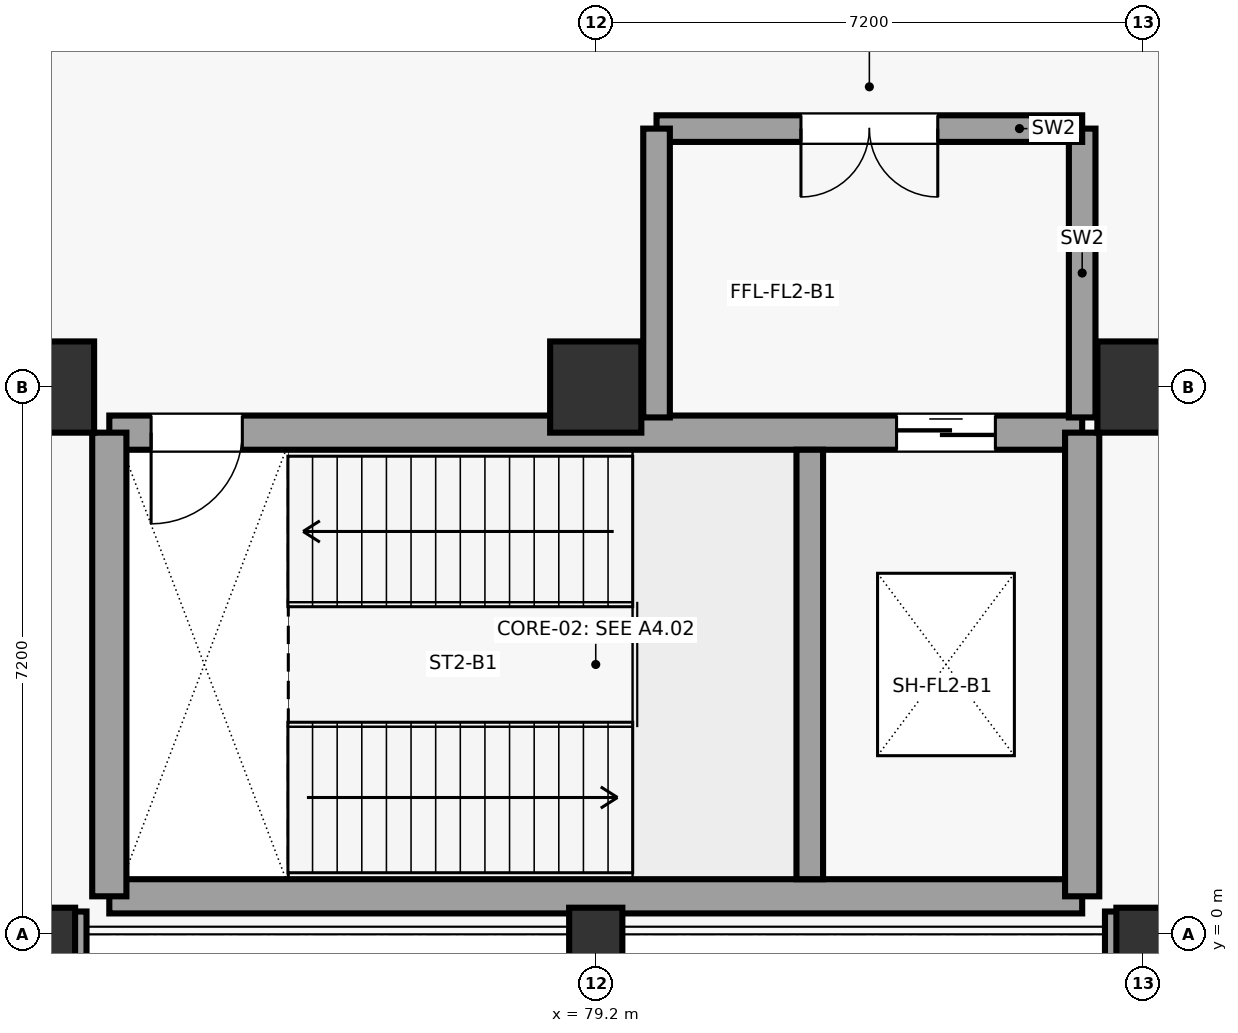
"""IFC4 building model, lengths in metres.
Left out: names, types, materials, properties, quantities, classifications, styles, units other than length and angle.
Written with IfcOpenShell. Run it as: python <this file> out.ifc"""

import sys

from ifc_helpers import new_model, si_unit, direction, frame, frame_2d, origin, origin_2d, place, context, subcontext, project, spatial, rectangle, circle, extrude, element, fill, save


model = new_model("IFC4")
c1 = context("Model", 3, precision=1e-05, world=origin(), true_north=direction((0.0, 1.0)))
c2 = subcontext(c1, "Body", "Model", "MODEL_VIEW")
j1 = project(units=[si_unit("LENGTHUNIT", "METRE"), si_unit("PLANEANGLEUNIT", "RADIAN")], contexts=[c1])
p1 = place(None, origin())
s1 = spatial("IfcSite", under=j1, at=p1, CompositionType="ELEMENT")
p2 = place(p1, origin())
s2 = spatial("IfcBuilding", under=s1, at=p2, CompositionType="ELEMENT")
p3 = place(p2, frame((0.0, 0.0, -5.4)))
s3 = spatial("IfcBuildingStorey", under=s2, at=p3, CompositionType="ELEMENT", Elevation=-5.4)
p4 = place(p3, frame((72.0, 0.0, 0.0), z_axis=(0.0, 0.0, 1.0), x_axis=(1.0, 0.0, 0.0)))
e1 = element("IfcColumn", 1, at=p4, inside=s3, PredefinedType="COLUMN", context=c2, shape_type="SweptSolid", body=[
    extrude(rectangle(XDim=0.7, YDim=0.7, at=origin_2d()), origin(), (0.0, 0.0, 1.0), 5.4),
])
p5 = place(p3, frame((72.0, 7.2, 0.0), z_axis=(0.0, 0.0, 1.0), x_axis=(1.0, 0.0, 0.0)))
e2 = element("IfcColumn", 2, at=p5, inside=s3, PredefinedType="COLUMN", context=c2, shape_type="SweptSolid", body=[
    extrude(circle(Radius=0.6, at=origin_2d()), origin(), (0.0, 0.0, 1.0), 5.4),
])
p6 = place(p3, frame((79.2, 0.0, 0.0), z_axis=(0.0, 0.0, 1.0), x_axis=(1.0, 0.0, 0.0)))
e3 = element("IfcColumn", 3, at=p6, inside=s3, PredefinedType="COLUMN", context=c2, shape_type="SweptSolid", body=[
    extrude(rectangle(XDim=0.7, YDim=0.7, at=origin_2d()), origin(), (0.0, 0.0, 1.0), 5.4),
])
p7 = place(p3, frame((79.2, 7.2, 0.0), z_axis=(0.0, 0.0, 1.0), x_axis=(1.0, 0.0, 0.0)))
e4 = element("IfcColumn", 4, at=p7, inside=s3, PredefinedType="COLUMN", context=c2, shape_type="SweptSolid", body=[
    extrude(circle(Radius=0.6, at=origin_2d()), origin(), (0.0, 0.0, 1.0), 5.4),
])
p8 = place(p3, frame((86.4, 0.0, 0.0), z_axis=(0.0, 0.0, 1.0), x_axis=(1.0, 0.0, 0.0)))
e5 = element("IfcColumn", 5, at=p8, inside=s3, PredefinedType="COLUMN", context=c2, shape_type="SweptSolid", body=[
    extrude(rectangle(XDim=0.7, YDim=0.7, at=origin_2d()), origin(), (0.0, 0.0, 1.0), 5.4),
])
p9 = place(p3, frame((86.4, 7.2, 0.0), z_axis=(0.0, 0.0, 1.0), x_axis=(1.0, 0.0, 0.0)))
e6 = element("IfcColumn", 6, at=p9, inside=s3, PredefinedType="COLUMN", context=c2, shape_type="SweptSolid", body=[
    extrude(circle(Radius=0.6, at=origin_2d()), origin(), (0.0, 0.0, 1.0), 5.4),
])
p10 = place(p3, frame((42.7, 0.0, 0.0), z_axis=(0.0, 0.0, 1.0), x_axis=(1.0, 0.0, 0.0)))
e7 = element("IfcWall", 7, at=p10, inside=s3, PredefinedType="USERDEFINED", context=c2, shape_type="SweptSolid", body=[
    extrude(rectangle(XDim=29.8, YDim=0.6, at=frame_2d((14.9, 0.0))), origin(), (0.0, 0.0, 1.0), 4.98),
])
p11 = place(p3, frame((85.9, 0.0, 0.0), z_axis=(0.0, 0.0, 1.0), x_axis=(1.0, 0.0, 0.0)))
e8 = element("IfcWall", 8, at=p11, inside=s3, PredefinedType="USERDEFINED", context=c2, shape_type="SweptSolid", body=[
    extrude(rectangle(XDim=29.3, YDim=0.6, at=frame_2d((14.65, 0.0))), origin(), (0.0, 0.0, 1.0), 4.98),
])
p12 = place(p3, frame((72.8, 0.5, 0.0), z_axis=(0.0, 0.0, 1.0), x_axis=(1.0, 0.0, 0.0)))
e9 = element("IfcWall", 9, at=p12, inside=s3, PredefinedType="SHEAR", context=c2, shape_type="SweptSolid", body=[
    extrude(rectangle(XDim=12.8, YDim=0.45, at=frame_2d((6.4, 0.0))), origin(), (0.0, 0.0, 1.0), 5.02),
])
p13 = place(p3, frame((72.8, 6.6, 0.0), z_axis=(0.0, 0.0, 1.0), x_axis=(1.0, 0.0, 0.0)))
e10 = element("IfcWall", 10, at=p13, inside=s3, PredefinedType="SHEAR", context=c2, shape_type="SweptSolid", body=[
    extrude(rectangle(XDim=12.8, YDim=0.45, at=frame_2d((6.4, 0.0))), origin(), (0.0, 0.0, 1.0), 5.02),
])
p14 = place(p13, frame((0.55, 0.0, 0.0)))
e11 = element("IfcOpeningElement", 11, at=p14, cuts=e10, PredefinedType="OPENING", context=c2, shape_type="SweptSolid", body=[
    extrude(rectangle(XDim=1.2, YDim=2.25, at=frame_2d((0.6, 1.125))), frame((0.0, 0.235, 0.0), z_axis=(0.0, -1.0, 0.0), x_axis=(1.0, 0.0, 0.0)), (0.0, 0.0, 1.0), 0.47),
])
p15 = place(p13, frame((10.358, 0.0, 0.0)))
e12 = element("IfcOpeningElement", 12, at=p15, cuts=e10, PredefinedType="OPENING", context=c2, shape_type="SweptSolid", body=[
    extrude(rectangle(XDim=1.3, YDim=2.25, at=frame_2d((0.65, 1.125))), frame((0.0, 0.235, 0.0), z_axis=(0.0, -1.0, 0.0), x_axis=(1.0, 0.0, 0.0)), (0.0, 0.0, 1.0), 0.47),
])
for number, where, z_axis, x_axis in (
    (13, (72.8, 0.5, 0.0), (0.0, 0.0, 1.0), (0.0, 1.0, 0.0)),
    (14, (85.6, 0.5, 0.0), (0.0, 0.0, 1.0), (0.0, 1.0, 0.0)),
):
    element("IfcWall", number, at=place(p3, frame(where, z_axis=z_axis, x_axis=x_axis)), inside=s3, PredefinedType="SHEAR", context=c2, shape_type="SweptSolid", body=[
        extrude(rectangle(XDim=6.1, YDim=0.45, at=frame_2d((3.05, 0.0))), origin(), (0.0, 0.0, 1.0), 5.02),
    ])
p16 = place(p3, frame((82.016, 0.725, 0.0), z_axis=(0.0, 0.0, 1.0), x_axis=(0.0, 1.0, 0.0)))
e15 = element("IfcWall", 15, at=p16, inside=s3, PredefinedType="SHEAR", context=c2, shape_type="SweptSolid", body=[
    extrude(rectangle(XDim=5.65, YDim=0.35, at=frame_2d((2.825, 0.0))), origin(), (0.0, 0.0, 1.0), 5.02),
])
p17 = place(p3, frame((85.6, 6.8, 0.0), z_axis=(0.0, 0.0, 1.0), x_axis=(0.0, 1.0, 0.0)))
e16 = element("IfcWall", 16, at=p17, inside=s3, PredefinedType="SHEAR", context=c2, shape_type="SweptSolid", body=[
    extrude(rectangle(XDim=3.8, YDim=0.35, at=frame_2d((1.9, 0.0))), origin(), (0.0, 0.0, 1.0), 4.04),
])
p18 = place(p3, frame((85.6, 10.6, 0.0), z_axis=(0.0, 0.0, 1.0), x_axis=(-1.0, 0.0, 0.0)))
e17 = element("IfcWall", 17, at=p18, inside=s3, PredefinedType="SHEAR", context=c2, shape_type="SweptSolid", body=[
    extrude(rectangle(XDim=5.6, YDim=0.35, at=frame_2d((2.8, 0.0))), origin(), (0.0, 0.0, 1.0), 4.04),
])
p19 = place(p18, frame((1.9, 0.0, 0.0)))
e18 = element("IfcOpeningElement", 18, at=p19, cuts=e17, PredefinedType="OPENING", context=c2, shape_type="SweptSolid", body=[
    extrude(rectangle(XDim=1.8, YDim=2.3, at=frame_2d((0.9, 1.15))), frame((0.0, 0.185, 0.0), z_axis=(0.0, -1.0, 0.0), x_axis=(1.0, 0.0, 0.0)), (0.0, 0.0, 1.0), 0.37),
])
p20 = place(p3, frame((80.0, 10.6, 0.0), z_axis=(0.0, 0.0, 1.0), x_axis=(0.0, -1.0, 0.0)))
e19 = element("IfcWall", 19, at=p20, inside=s3, PredefinedType="SHEAR", context=c2, shape_type="SweptSolid", body=[
    extrude(rectangle(XDim=3.8, YDim=0.35, at=frame_2d((1.9, 0.0))), origin(), (0.0, 0.0, 1.0), 4.04),
])
p21 = place(p14, frame((1.2, 0.0, 0.0), z_axis=(0.0, 0.0, 1.0), x_axis=(-1.0, 0.0, 0.0)))
e20 = element("IfcDoor", 20, at=p21, inside=s3, OperationType="SINGLE_SWING_LEFT", PredefinedType="DOOR", context=c2, shape_type="SweptSolid", body=[
    extrude(rectangle(XDim=1.2, YDim=2.25, at=frame_2d((0.6, 1.125))), frame((0.0, 0.025, 0.0), z_axis=(0.0, -1.0, 0.0), x_axis=(1.0, 0.0, 0.0)), (0.0, 0.0, 1.0), 0.05),
])
fill(e11, e20)
p22 = place(p15, origin())
e21 = element("IfcDoor", 21, at=p22, inside=s3, OperationType="SLIDING_TO_LEFT", PredefinedType="DOOR", context=c2, shape_type="SweptSolid", body=[
    extrude(rectangle(XDim=1.3, YDim=2.25, at=frame_2d((0.65, 1.125))), frame((0.0, 0.025, 0.0), z_axis=(0.0, -1.0, 0.0), x_axis=(1.0, 0.0, 0.0)), (0.0, 0.0, 1.0), 0.05),
])
fill(e12, e21)
p23 = place(p19, origin())
e22 = element("IfcDoor", 22, at=p23, inside=s3, OperationType="DOUBLE_DOOR_SINGLE_SWING", PredefinedType="DOOR", context=c2, shape_type="SweptSolid", body=[
    extrude(rectangle(XDim=1.8, YDim=2.3, at=frame_2d((0.9, 1.15))), frame((0.0, 0.025, 0.0), z_axis=(0.0, -1.0, 0.0), x_axis=(1.0, 0.0, 0.0)), (0.0, 0.0, 1.0), 0.05),
])
fill(e18, e22)
save(model, sys.argv[1])
